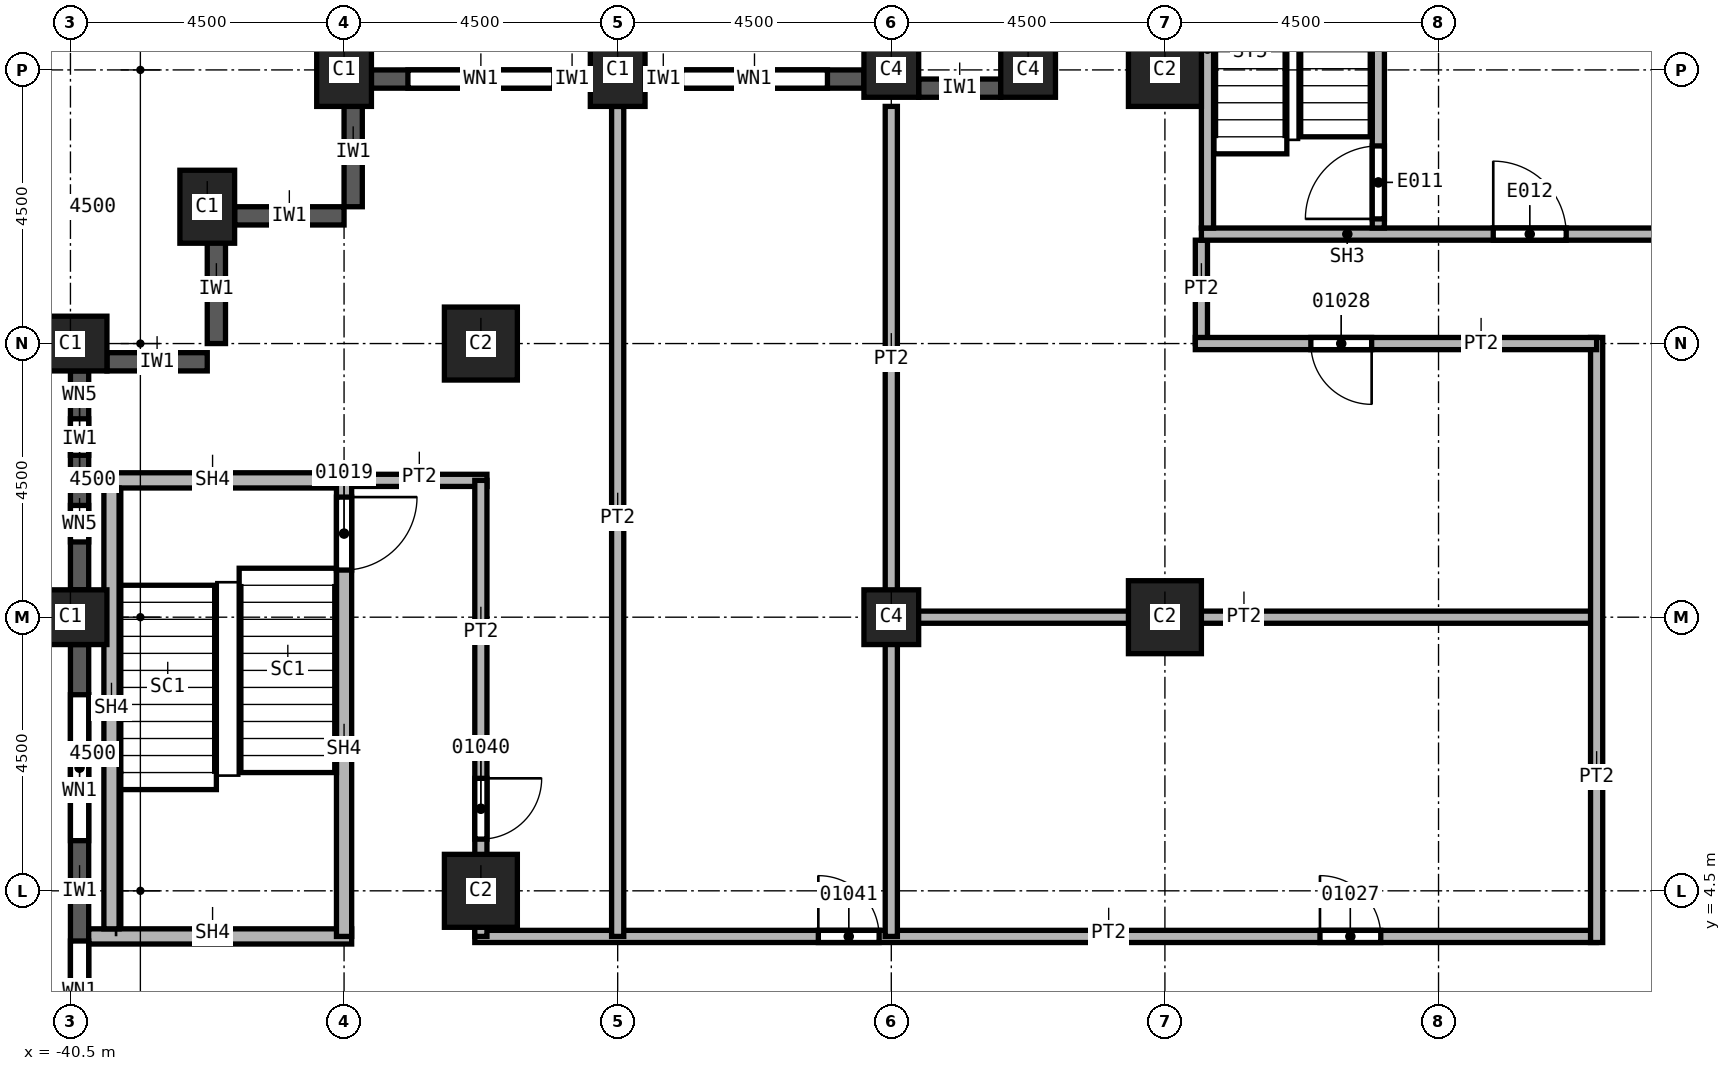
"""IFC4 building model, lengths in metres.
Left out: names, types, materials, properties, quantities, classifications, styles, units other than length and angle.
Written with IfcOpenShell. Run it as: python <this file> out.ifc"""

import sys

from ifc_helpers import new_model, si_unit, direction, frame, frame_2d, origin, origin_2d, place, context, subcontext, project, spatial, rectangle, extrude, element, fill, save


model = new_model("IFC4")
c1 = context("Model", 3, precision=1e-05, world=origin(), true_north=direction((0.0, 1.0)))
c2 = subcontext(c1, "Body", "Model", "MODEL_VIEW")
j1 = project(units=[si_unit("LENGTHUNIT", "METRE"), si_unit("PLANEANGLEUNIT", "RADIAN")], contexts=[c1])
p1 = place(None, origin())
s1 = spatial("IfcSite", under=j1, at=p1, CompositionType="ELEMENT")
p2 = place(p1, origin())
s2 = spatial("IfcBuilding", under=s1, at=p2, CompositionType="ELEMENT")
p3 = place(p2, frame((0.0, 0.0, 72.0)))
s3 = spatial("IfcBuildingStorey", under=s2, at=p3, CompositionType="ELEMENT", Elevation=72.0)
for number, where, z_axis, x_axis in (
    (1, (-40.5, 9.0, 0.0), (0.0, 0.0, 1.0), (0.0, 1.0, 0.0)),
    (2, (-40.5, 13.5, 0.0), (0.0, 0.0, 1.0), (0.0, 1.0, 0.0)),
    (3, (-38.25, 15.75, 0.0), (0.0, 0.0, 1.0), (1.0, 0.0, 0.0)),
    (4, (-31.5, 18.0, 0.0), (0.0, 0.0, 1.0), (1.0, 0.0, 0.0)),
    (5, (-36.0, 18.0, 0.0), (0.0, 0.0, 1.0), (1.0, 0.0, 0.0)),
):
    element("IfcColumn", number, at=place(p3, frame(where, z_axis=z_axis, x_axis=x_axis)), inside=s3, PredefinedType="COLUMN", context=c2, shape_type="SweptSolid", body=[
        extrude(rectangle(XDim=0.9, YDim=1.2, at=origin_2d()), origin(), (0.0, 0.0, 1.0), 3.7),
    ])
for number, where, z_axis, x_axis in (
    (6, (-33.75, 4.5, 0.0), (0.0, 0.0, 1.0), (1.0, 0.0, 0.0)),
    (7, (-33.75, 13.5, 0.0), (0.0, 0.0, 1.0), (1.0, 0.0, 0.0)),
    (8, (-22.5, 9.0, 0.0), (0.0, 0.0, 1.0), (1.0, 0.0, 0.0)),
    (9, (-22.5, 18.0, 0.0), (0.0, 0.0, 1.0), (1.0, 0.0, 0.0)),
):
    element("IfcColumn", number, at=place(p3, frame(where, z_axis=z_axis, x_axis=x_axis)), inside=s3, PredefinedType="COLUMN", context=c2, shape_type="SweptSolid", body=[
        extrude(rectangle(XDim=1.2, YDim=1.2, at=origin_2d()), origin(), (0.0, 0.0, 1.0), 3.7),
    ])
for number, where, z_axis, x_axis in (
    (10, (-27.0, 9.0, 0.0), (0.0, 0.0, 1.0), (1.0, 0.0, 0.0)),
    (11, (-27.0, 18.0, 0.0), (0.0, 0.0, 1.0), (1.0, 0.0, 0.0)),
    (12, (-24.75, 18.0, 0.0), (0.0, 0.0, 1.0), (1.0, 0.0, 0.0)),
):
    element("IfcColumn", number, at=place(p3, frame(where, z_axis=z_axis, x_axis=x_axis)), inside=s3, PredefinedType="COLUMN", context=c2, shape_type="SweptSolid", body=[
        extrude(rectangle(XDim=0.9, YDim=0.9, at=origin_2d()), origin(), (0.0, 0.0, 1.0), 3.7),
    ])
for number, where, z_axis, x_axis in (
    (13, (-35.85, 17.55, 0.0), (0.0, 0.0, 1.0), (0.0, -1.0, 0.0)),
    (14, (-37.8, 15.6, 0.0), (0.0, 0.0, 1.0), (1.0, 0.0, 0.0)),
    (15, (-38.1, 15.3, 0.0), (0.0, 0.0, 1.0), (0.0, -1.0, 0.0)),
):
    element("IfcWall", number, at=place(p3, frame(where, z_axis=z_axis, x_axis=x_axis)), inside=s3, PredefinedType="SOLIDWALL", context=c2, shape_type="SweptSolid", body=[
        extrude(rectangle(XDim=1.8, YDim=0.3, at=frame_2d((0.9, 0.0))), origin(), (0.0, 0.0, 1.0), 3.1),
    ])
p4 = place(p3, frame((-39.9, 13.2, 0.0), z_axis=(0.0, 0.0, 1.0), x_axis=(1.0, 0.0, 0.0)))
e16 = element("IfcWall", 16, at=p4, inside=s3, PredefinedType="SOLIDWALL", context=c2, shape_type="SweptSolid", body=[
    extrude(rectangle(XDim=1.65, YDim=0.3, at=frame_2d((0.825, 0.0))), origin(), (0.0, 0.0, 1.0), 3.1),
])
p5 = place(p3, frame((-25.2, 17.7, 0.0), z_axis=(0.0, 0.0, 1.0), x_axis=(-1.0, 0.0, 0.0)))
e17 = element("IfcWall", 17, at=p5, inside=s3, PredefinedType="SOLIDWALL", context=c2, shape_type="SweptSolid", body=[
    extrude(rectangle(XDim=1.35, YDim=0.3, at=frame_2d((0.675, 0.0))), origin(), (0.0, 0.0, 1.0), 3.1),
])
p6 = place(p3, frame((-27.45, 17.85, 0.0), z_axis=(0.0, 0.0, 1.0), x_axis=(-1.0, 0.0, 0.0)))
e18 = element("IfcWall", 18, at=p6, inside=s3, PredefinedType="SOLIDWALL", context=c2, shape_type="SweptSolid", body=[
    extrude(rectangle(XDim=3.6, YDim=0.3, at=frame_2d((1.8, 0.0))), origin(), (0.0, 0.0, 1.0), 3.1),
])
p7 = place(p6, frame((0.6, 0.0, 0.8)))
e19 = element("IfcOpeningElement", 19, at=p7, cuts=e18, PredefinedType="OPENING", context=c2, shape_type="SweptSolid", body=[
    extrude(rectangle(XDim=2.4, YDim=1.95, at=frame_2d((1.2, 0.975))), frame((0.0, 0.15, 0.0), z_axis=(0.0, -1.0, 0.0), x_axis=(1.0, 0.0, 0.0)), (0.0, 0.0, 1.0), 0.3),
])
p8 = place(p3, frame((-31.95, 17.85, 0.0), z_axis=(0.0, 0.0, 1.0), x_axis=(-1.0, 0.0, 0.0)))
e20 = element("IfcWall", 20, at=p8, inside=s3, PredefinedType="SOLIDWALL", context=c2, shape_type="SweptSolid", body=[
    extrude(rectangle(XDim=3.6, YDim=0.3, at=frame_2d((1.8, 0.0))), origin(), (0.0, 0.0, 1.0), 3.1),
])
p9 = place(p8, frame((0.6, 0.0, 0.8)))
e21 = element("IfcOpeningElement", 21, at=p9, cuts=e20, PredefinedType="OPENING", context=c2, shape_type="SweptSolid", body=[
    extrude(rectangle(XDim=2.4, YDim=1.95, at=frame_2d((1.2, 0.975))), frame((0.0, 0.15, 0.0), z_axis=(0.0, -1.0, 0.0), x_axis=(1.0, 0.0, 0.0)), (0.0, 0.0, 1.0), 0.3),
])
p10 = place(p3, frame((-40.35, 13.05, 0.0), z_axis=(0.0, 0.0, 1.0), x_axis=(0.0, -1.0, 0.0)))
e22 = element("IfcWall", 22, at=p10, inside=s3, PredefinedType="SOLIDWALL", context=c2, shape_type="SweptSolid", body=[
    extrude(rectangle(XDim=3.6, YDim=0.3, at=frame_2d((1.8, 0.0))), origin(), (0.0, 0.0, 1.0), 3.1),
])
p11 = place(p10, frame((0.788, 0.0, 0.8)))
e23 = element("IfcOpeningElement", 23, at=p11, cuts=e22, PredefinedType="OPENING", context=c2, shape_type="SweptSolid", body=[
    extrude(rectangle(XDim=0.6, YDim=1.95, at=frame_2d((0.3, 0.975))), frame((0.0, 0.15, 0.0), z_axis=(0.0, -1.0, 0.0), x_axis=(1.0, 0.0, 0.0)), (0.0, 0.0, 1.0), 0.3),
])
p12 = place(p10, frame((2.212, 0.0, 0.8)))
e24 = element("IfcOpeningElement", 24, at=p12, cuts=e22, PredefinedType="OPENING", context=c2, shape_type="SweptSolid", body=[
    extrude(rectangle(XDim=0.6, YDim=1.95, at=frame_2d((0.3, 0.975))), frame((0.0, 0.15, 0.0), z_axis=(0.0, -1.0, 0.0), x_axis=(1.0, 0.0, 0.0)), (0.0, 0.0, 1.0), 0.3),
])
p13 = place(p3, frame((-40.35, 8.55, 0.0), z_axis=(0.0, 0.0, 1.0), x_axis=(0.0, -1.0, 0.0)))
e25 = element("IfcWall", 25, at=p13, inside=s3, PredefinedType="SOLIDWALL", context=c2, shape_type="SweptSolid", body=[
    extrude(rectangle(XDim=8.1, YDim=0.3, at=frame_2d((4.05, 0.0))), origin(), (0.0, 0.0, 1.0), 3.1),
])
p14 = place(p13, frame((0.825, 0.0, 0.8)))
e26 = element("IfcOpeningElement", 26, at=p14, cuts=e25, PredefinedType="OPENING", context=c2, shape_type="SweptSolid", body=[
    extrude(rectangle(XDim=2.4, YDim=1.95, at=frame_2d((1.2, 0.975))), frame((0.0, 0.15, 0.0), z_axis=(0.0, -1.0, 0.0), x_axis=(1.0, 0.0, 0.0)), (0.0, 0.0, 1.0), 0.3),
])
p15 = place(p13, frame((4.875, 0.0, 0.8)))
e27 = element("IfcOpeningElement", 27, at=p15, cuts=e25, PredefinedType="OPENING", context=c2, shape_type="SweptSolid", body=[
    extrude(rectangle(XDim=2.4, YDim=1.95, at=frame_2d((1.2, 0.975))), frame((0.0, 0.15, 0.0), z_axis=(0.0, -1.0, 0.0), x_axis=(1.0, 0.0, 0.0)), (0.0, 0.0, 1.0), 0.3),
])
p16 = place(p3, frame((-36.0, 11.25, 0.0), z_axis=(0.0, 0.0, 1.0), x_axis=(1.0, 0.0, 0.0)))
e28 = element("IfcWall", 28, at=p16, inside=s3, PredefinedType="PARTITIONING", context=c2, shape_type="SweptSolid", body=[
    extrude(rectangle(XDim=2.35, YDim=0.2, at=frame_2d((1.175, 0.0))), origin(), (0.0, 0.0, 1.0), 3.7),
])
p17 = place(p3, frame((-33.85, 3.75, 0.0), z_axis=(0.0, 0.0, 1.0), x_axis=(1.0, 0.0, 0.0)))
e29 = element("IfcWall", 29, at=p17, inside=s3, PredefinedType="PARTITIONING", context=c2, shape_type="SweptSolid", body=[
    extrude(rectangle(XDim=18.45, YDim=0.2, at=frame_2d((9.225, 0.0))), origin(), (0.0, 0.0, 1.0), 3.7),
])
p18 = place(p17, frame((13.9, 0.0, 0.0)))
e30 = element("IfcOpeningElement", 30, at=p18, cuts=e29, PredefinedType="OPENING", context=c2, shape_type="SweptSolid", body=[
    extrude(rectangle(XDim=1.0, YDim=2.1, at=frame_2d((0.5, 1.05))), frame((0.0, 0.1, 0.0), z_axis=(0.0, -1.0, 0.0), x_axis=(1.0, 0.0, 0.0)), (0.0, 0.0, 1.0), 0.2),
])
p19 = place(p17, frame((5.65, 0.0, 0.0)))
e31 = element("IfcOpeningElement", 31, at=p19, cuts=e29, PredefinedType="OPENING", context=c2, shape_type="SweptSolid", body=[
    extrude(rectangle(XDim=1.0, YDim=2.1, at=frame_2d((0.5, 1.05))), frame((0.0, 0.1, 0.0), z_axis=(0.0, -1.0, 0.0), x_axis=(1.0, 0.0, 0.0)), (0.0, 0.0, 1.0), 0.2),
])
p20 = place(p3, frame((-33.75, 11.25, 0.0), z_axis=(0.0, 0.0, 1.0), x_axis=(0.0, -1.0, 0.0)))
e32 = element("IfcWall", 32, at=p20, inside=s3, PredefinedType="PARTITIONING", context=c2, shape_type="SweptSolid", body=[
    extrude(rectangle(XDim=7.5, YDim=0.2, at=frame_2d((3.75, 0.0))), origin(), (0.0, 0.0, 1.0), 3.7),
])
p21 = place(p20, frame((4.9, 0.0, 0.0)))
e33 = element("IfcOpeningElement", 33, at=p21, cuts=e32, PredefinedType="OPENING", context=c2, shape_type="SweptSolid", body=[
    extrude(rectangle(XDim=1.0, YDim=2.1, at=frame_2d((0.5, 1.05))), frame((0.0, 0.1, 0.0), z_axis=(0.0, -1.0, 0.0), x_axis=(1.0, 0.0, 0.0)), (0.0, 0.0, 1.0), 0.2),
])
p22 = place(p3, frame((-31.5, 17.4, 0.0), z_axis=(0.0, 0.0, 1.0), x_axis=(0.0, -1.0, 0.0)))
e34 = element("IfcWall", 34, at=p22, inside=s3, PredefinedType="PARTITIONING", context=c2, shape_type="SweptSolid", body=[
    extrude(rectangle(XDim=13.65, YDim=0.2, at=frame_2d((6.825, 0.0))), origin(), (0.0, 0.0, 1.0), 3.7),
])
p23 = place(p3, frame((-27.1, 9.0, 0.0), z_axis=(0.0, 0.0, 1.0), x_axis=(1.0, 0.0, 0.0)))
e35 = element("IfcWall", 35, at=p23, inside=s3, PredefinedType="PARTITIONING", context=c2, shape_type="SweptSolid", body=[
    extrude(rectangle(XDim=11.7, YDim=0.2, at=frame_2d((5.85, 0.0))), origin(), (0.0, 0.0, 1.0), 3.7),
])
p24 = place(p3, frame((-27.0, 3.75, 0.0), z_axis=(0.0, 0.0, 1.0), x_axis=(0.0, 1.0, 0.0)))
e36 = element("IfcWall", 36, at=p24, inside=s3, PredefinedType="PARTITIONING", context=c2, shape_type="SweptSolid", body=[
    extrude(rectangle(XDim=13.65, YDim=0.2, at=frame_2d((6.825, 0.0))), origin(), (0.0, 0.0, 1.0), 3.7),
])
p25 = place(p3, frame((-21.9, 13.5, 0.0), z_axis=(0.0, 0.0, 1.0), x_axis=(0.0, 1.0, 0.0)))
e37 = element("IfcWall", 37, at=p25, inside=s3, PredefinedType="PARTITIONING", context=c2, shape_type="SweptSolid", body=[
    extrude(rectangle(XDim=1.7, YDim=0.2, at=frame_2d((0.85, 0.0))), origin(), (0.0, 0.0, 1.0), 3.7),
])
p26 = place(p3, frame((-15.4, 3.65, 0.0), z_axis=(0.0, 0.0, 1.0), x_axis=(0.0, 1.0, 0.0)))
e38 = element("IfcWall", 38, at=p26, inside=s3, PredefinedType="PARTITIONING", context=c2, shape_type="SweptSolid", body=[
    extrude(rectangle(XDim=9.95, YDim=0.2, at=frame_2d((4.975, 0.0))), origin(), (0.0, 0.0, 1.0), 3.7),
])
p27 = place(p3, frame((-15.4, 13.5, 0.0), z_axis=(0.0, 0.0, 1.0), x_axis=(-1.0, 0.0, 0.0)))
e39 = element("IfcWall", 39, at=p27, inside=s3, PredefinedType="PARTITIONING", context=c2, shape_type="SweptSolid", body=[
    extrude(rectangle(XDim=6.6, YDim=0.2, at=frame_2d((3.3, 0.0))), origin(), (0.0, 0.0, 1.0), 3.7),
])
p28 = place(p27, frame((3.7, 0.0, 0.0)))
e40 = element("IfcOpeningElement", 40, at=p28, cuts=e39, PredefinedType="OPENING", context=c2, shape_type="SweptSolid", body=[
    extrude(rectangle(XDim=1.0, YDim=2.1, at=frame_2d((0.5, 1.05))), frame((0.0, 0.1, 0.0), z_axis=(0.0, -1.0, 0.0), x_axis=(1.0, 0.0, 0.0)), (0.0, 0.0, 1.0), 0.2),
])
p29 = place(p3, frame((-40.2, 3.75, 0.0), z_axis=(0.0, 0.0, 1.0), x_axis=(1.0, 0.0, 0.0)))
e41 = element("IfcWall", 41, at=p29, inside=s3, PredefinedType="SOLIDWALL", context=c2, shape_type="SweptSolid", body=[
    extrude(rectangle(XDim=4.325, YDim=0.25, at=frame_2d((2.163, 0.0))), origin(), (0.0, 0.0, 1.0), 3.7),
])
p30 = place(p3, frame((-40.2, 11.25, 0.0), z_axis=(0.0, 0.0, 1.0), x_axis=(1.0, 0.0, 0.0)))
e42 = element("IfcWall", 42, at=p30, inside=s3, PredefinedType="SOLIDWALL", context=c2, shape_type="SweptSolid", body=[
    extrude(rectangle(XDim=4.2, YDim=0.25, at=frame_2d((2.1, 0.0))), origin(), (0.0, 0.0, 1.0), 3.7),
])
p31 = place(p3, frame((-36.0, 11.375, 0.0), z_axis=(0.0, 0.0, 1.0), x_axis=(0.0, -1.0, 0.0)))
e43 = element("IfcWall", 43, at=p31, inside=s3, PredefinedType="SOLIDWALL", context=c2, shape_type="SweptSolid", body=[
    extrude(rectangle(XDim=7.625, YDim=0.25, at=frame_2d((3.812, 0.0))), origin(), (0.0, 0.0, 1.0), 3.7),
])
p32 = place(p31, frame((0.4, 0.0, 0.0)))
e44 = element("IfcOpeningElement", 44, at=p32, cuts=e43, PredefinedType="OPENING", context=c2, shape_type="SweptSolid", body=[
    extrude(rectangle(XDim=1.2, YDim=2.1, at=frame_2d((0.6, 1.05))), frame((0.0, 0.125, 0.0), z_axis=(0.0, -1.0, 0.0), x_axis=(1.0, 0.0, 0.0)), (0.0, 0.0, 1.0), 0.25),
])
p33 = place(p3, frame((-21.9, 15.3, 0.0), z_axis=(0.0, 0.0, 1.0), x_axis=(1.0, 0.0, 0.0)))
e45 = element("IfcWall", 45, at=p33, inside=s3, PredefinedType="SOLIDWALL", context=c2, shape_type="SweptSolid", body=[
    extrude(rectangle(XDim=8.275, YDim=0.2, at=frame_2d((4.137, 0.0))), origin(), (0.0, 0.0, 1.0), 3.7),
])
p34 = place(p33, frame((4.8, 0.0, 0.0)))
e46 = element("IfcOpeningElement", 46, at=p34, cuts=e45, PredefinedType="OPENING", context=c2, shape_type="SweptSolid", body=[
    extrude(rectangle(XDim=1.2, YDim=2.1, at=frame_2d((0.6, 1.05))), frame((0.0, 0.1, 0.0), z_axis=(0.0, -1.0, 0.0), x_axis=(1.0, 0.0, 0.0)), (0.0, 0.0, 1.0), 0.2),
])
p35 = place(p3, frame((-21.8, 15.4, 0.0), z_axis=(0.0, 0.0, 1.0), x_axis=(0.0, 1.0, 0.0)))
e47 = element("IfcWall", 47, at=p35, inside=s3, PredefinedType="SOLIDWALL", context=c2, shape_type="SweptSolid", body=[
    extrude(rectangle(XDim=5.9, YDim=0.2, at=frame_2d((2.95, 0.0))), origin(), (0.0, 0.0, 1.0), 3.7),
])
p36 = place(p3, frame((-18.99, 15.4, 0.0), z_axis=(0.0, 0.0, 1.0), x_axis=(0.0, 1.0, 0.0)))
e48 = element("IfcWall", 48, at=p36, inside=s3, PredefinedType="SOLIDWALL", context=c2, shape_type="SweptSolid", body=[
    extrude(rectangle(XDim=5.9, YDim=0.2, at=frame_2d((2.95, 0.0))), origin(), (0.0, 0.0, 1.0), 3.7),
])
p37 = place(p36, frame((0.15, 0.0, 0.0)))
e49 = element("IfcOpeningElement", 49, at=p37, cuts=e48, PredefinedType="OPENING", context=c2, shape_type="SweptSolid", body=[
    extrude(rectangle(XDim=1.2, YDim=2.1, at=frame_2d((0.6, 1.05))), frame((0.0, 0.1, 0.0), z_axis=(0.0, -1.0, 0.0), x_axis=(1.0, 0.0, 0.0)), (0.0, 0.0, 1.0), 0.2),
])
p38 = place(p3, frame((-39.825, 3.875, 0.0), z_axis=(0.0, 0.0, 1.0), x_axis=(0.0, 1.0, 0.0)))
e50 = element("IfcWall", 50, at=p38, inside=s3, PredefinedType="SOLIDWALL", context=c2, shape_type="SweptSolid", body=[
    extrude(rectangle(XDim=7.25, YDim=0.25, at=frame_2d((3.625, 0.0))), origin(), (0.0, 0.0, 1.0), 3.7),
])
p39 = place(p7, origin())
e51 = element("IfcWindow", 51, at=p39, inside=s3, PartitioningType="SINGLE_PANEL", PredefinedType="WINDOW", context=c2, shape_type="SweptSolid", body=[
    extrude(rectangle(XDim=2.4, YDim=1.95, at=frame_2d((1.2, 0.975))), frame((0.0, 0.03, 0.0), z_axis=(0.0, -1.0, 0.0), x_axis=(1.0, 0.0, 0.0)), (0.0, 0.0, 1.0), 0.06),
])
fill(e19, e51)
p40 = place(p9, origin())
e52 = element("IfcWindow", 52, at=p40, inside=s3, PartitioningType="SINGLE_PANEL", PredefinedType="WINDOW", context=c2, shape_type="SweptSolid", body=[
    extrude(rectangle(XDim=2.4, YDim=1.95, at=frame_2d((1.2, 0.975))), frame((0.0, 0.03, 0.0), z_axis=(0.0, -1.0, 0.0), x_axis=(1.0, 0.0, 0.0)), (0.0, 0.0, 1.0), 0.06),
])
fill(e21, e52)
p41 = place(p14, origin())
e53 = element("IfcWindow", 53, at=p41, inside=s3, PartitioningType="SINGLE_PANEL", PredefinedType="WINDOW", context=c2, shape_type="SweptSolid", body=[
    extrude(rectangle(XDim=2.4, YDim=1.95, at=frame_2d((1.2, 0.975))), frame((0.0, 0.03, 0.0), z_axis=(0.0, -1.0, 0.0), x_axis=(1.0, 0.0, 0.0)), (0.0, 0.0, 1.0), 0.06),
])
fill(e26, e53)
p42 = place(p15, origin())
e54 = element("IfcWindow", 54, at=p42, inside=s3, PartitioningType="SINGLE_PANEL", PredefinedType="WINDOW", context=c2, shape_type="SweptSolid", body=[
    extrude(rectangle(XDim=2.4, YDim=1.95, at=frame_2d((1.2, 0.975))), frame((0.0, 0.03, 0.0), z_axis=(0.0, -1.0, 0.0), x_axis=(1.0, 0.0, 0.0)), (0.0, 0.0, 1.0), 0.06),
])
fill(e27, e54)
p43 = place(p32, origin())
e55 = element("IfcDoor", 55, at=p43, inside=s3, OperationType="SINGLE_SWING_RIGHT", PredefinedType="DOOR", context=c2, shape_type="SweptSolid", body=[
    extrude(rectangle(XDim=1.2, YDim=2.1, at=frame_2d((0.6, 1.05))), frame((0.0, 0.025, 0.0), z_axis=(0.0, -1.0, 0.0), x_axis=(1.0, 0.0, 0.0)), (0.0, 0.0, 1.0), 0.05),
])
fill(e44, e55)
p44 = place(p18, origin())
e56 = element("IfcDoor", 56, at=p44, inside=s3, OperationType="SINGLE_SWING_RIGHT", PredefinedType="DOOR", context=c2, shape_type="SweptSolid", body=[
    extrude(rectangle(XDim=1.0, YDim=2.1, at=frame_2d((0.5, 1.05))), frame((0.0, 0.025, 0.0), z_axis=(0.0, -1.0, 0.0), x_axis=(1.0, 0.0, 0.0)), (0.0, 0.0, 1.0), 0.05),
])
fill(e30, e56)
p45 = place(p28, origin())
e57 = element("IfcDoor", 57, at=p45, inside=s3, OperationType="SINGLE_SWING_LEFT", PredefinedType="DOOR", context=c2, shape_type="SweptSolid", body=[
    extrude(rectangle(XDim=1.0, YDim=2.1, at=frame_2d((0.5, 1.05))), frame((0.0, 0.025, 0.0), z_axis=(0.0, -1.0, 0.0), x_axis=(1.0, 0.0, 0.0)), (0.0, 0.0, 1.0), 0.05),
])
fill(e40, e57)
p46 = place(p21, origin())
e58 = element("IfcDoor", 58, at=p46, inside=s3, OperationType="SINGLE_SWING_LEFT", PredefinedType="DOOR", context=c2, shape_type="SweptSolid", body=[
    extrude(rectangle(XDim=1.0, YDim=2.1, at=frame_2d((0.5, 1.05))), frame((0.0, 0.025, 0.0), z_axis=(0.0, -1.0, 0.0), x_axis=(1.0, 0.0, 0.0)), (0.0, 0.0, 1.0), 0.05),
])
fill(e33, e58)
p47 = place(p19, origin())
e59 = element("IfcDoor", 59, at=p47, inside=s3, OperationType="SINGLE_SWING_RIGHT", PredefinedType="DOOR", context=c2, shape_type="SweptSolid", body=[
    extrude(rectangle(XDim=1.0, YDim=2.1, at=frame_2d((0.5, 1.05))), frame((0.0, 0.025, 0.0), z_axis=(0.0, -1.0, 0.0), x_axis=(1.0, 0.0, 0.0)), (0.0, 0.0, 1.0), 0.05),
])
fill(e31, e59)
p48 = place(p37, origin())
e60 = element("IfcDoor", 60, at=p48, inside=s3, OperationType="SINGLE_SWING_LEFT", PredefinedType="DOOR", context=c2, shape_type="SweptSolid", body=[
    extrude(rectangle(XDim=1.2, YDim=2.1, at=frame_2d((0.6, 1.05))), frame((0.0, 0.025, 0.0), z_axis=(0.0, -1.0, 0.0), x_axis=(1.0, 0.0, 0.0)), (0.0, 0.0, 1.0), 0.05),
])
fill(e49, e60)
p49 = place(p34, origin())
e61 = element("IfcDoor", 61, at=p49, inside=s3, OperationType="SINGLE_SWING_RIGHT", PredefinedType="DOOR", context=c2, shape_type="SweptSolid", body=[
    extrude(rectangle(XDim=1.2, YDim=2.1, at=frame_2d((0.6, 1.05))), frame((0.0, 0.025, 0.0), z_axis=(0.0, -1.0, 0.0), x_axis=(1.0, 0.0, 0.0)), (0.0, 0.0, 1.0), 0.05),
])
fill(e46, e61)
p50 = place(p11, origin())
e62 = element("IfcWindow", 62, at=p50, inside=s3, PartitioningType="SINGLE_PANEL", PredefinedType="WINDOW", context=c2, shape_type="SweptSolid", body=[
    extrude(rectangle(XDim=0.6, YDim=1.95, at=frame_2d((0.3, 0.975))), frame((0.0, 0.03, 0.0), z_axis=(0.0, -1.0, 0.0), x_axis=(1.0, 0.0, 0.0)), (0.0, 0.0, 1.0), 0.06),
])
fill(e23, e62)
p51 = place(p12, origin())
e63 = element("IfcWindow", 63, at=p51, inside=s3, PartitioningType="SINGLE_PANEL", PredefinedType="WINDOW", context=c2, shape_type="SweptSolid", body=[
    extrude(rectangle(XDim=0.6, YDim=1.95, at=frame_2d((0.3, 0.975))), frame((0.0, 0.03, 0.0), z_axis=(0.0, -1.0, 0.0), x_axis=(1.0, 0.0, 0.0)), (0.0, 0.0, 1.0), 0.06),
])
fill(e24, e63)
save(model, sys.argv[1])
